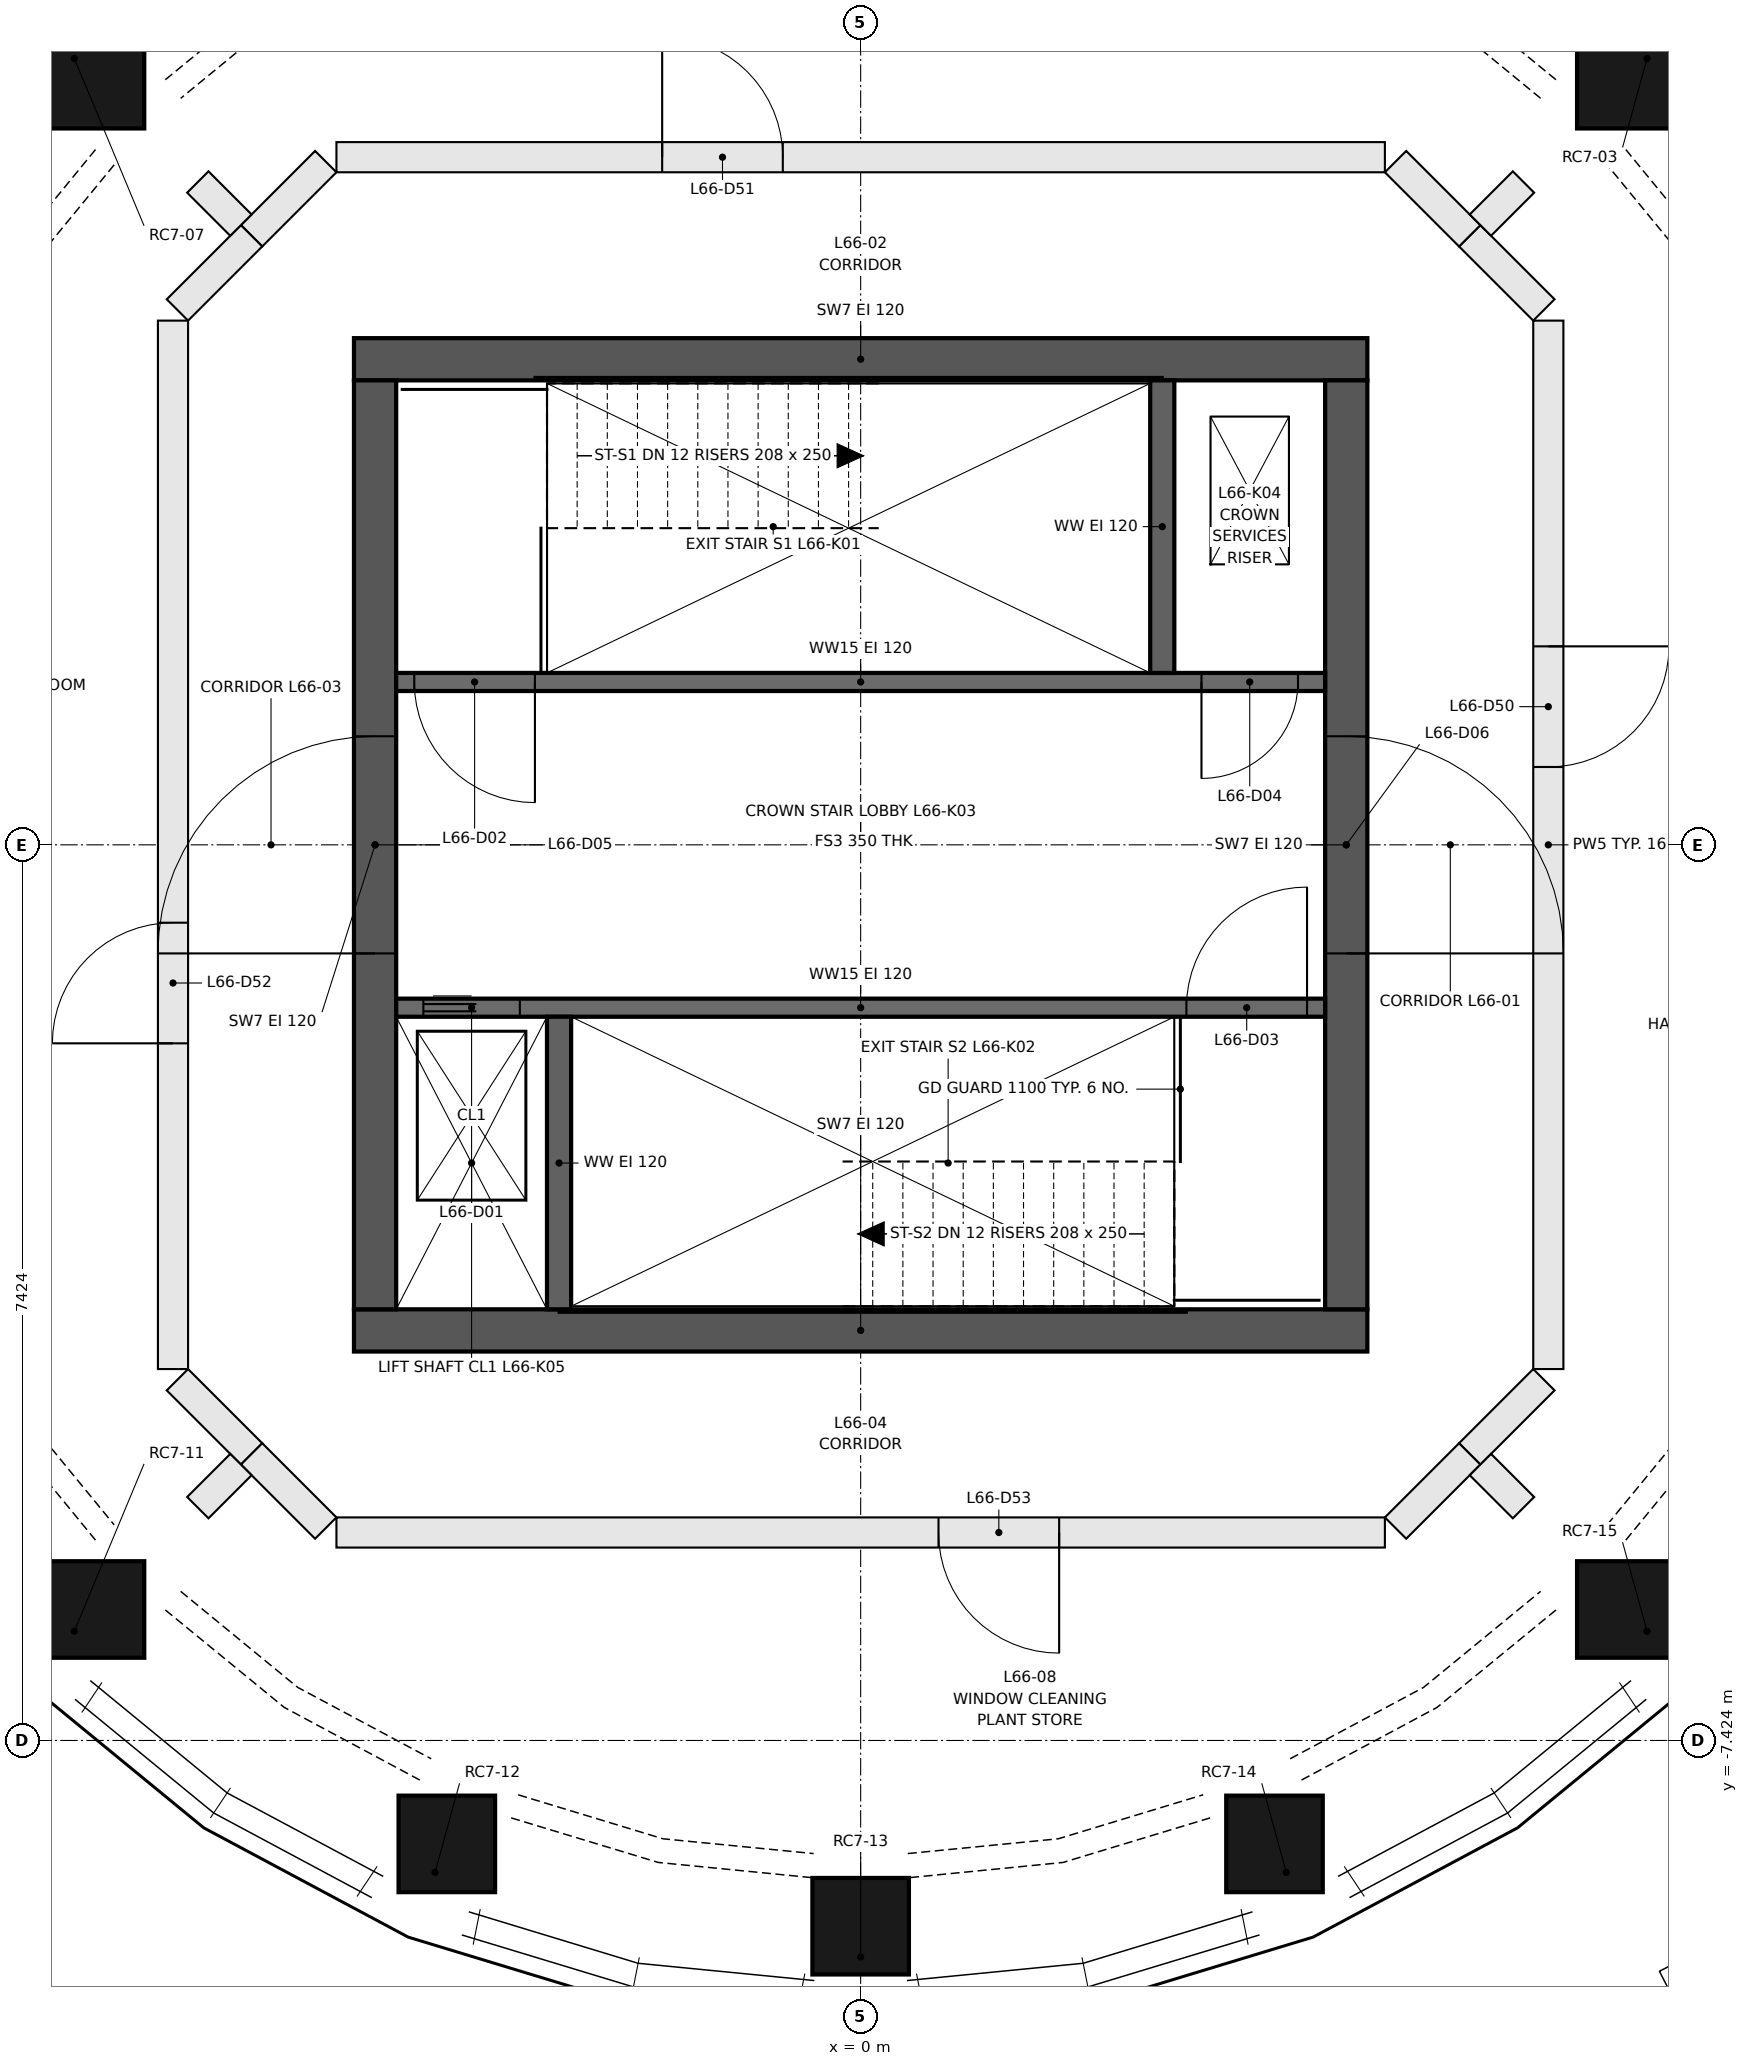
"""IFC4 building model, lengths in metres.
Left out: names, types, materials, properties, quantities, classifications, styles, units other than length and angle.
Written with IfcOpenShell. Run it as: python <this file> out.ifc"""

import sys

from ifc_helpers import new_model, si_unit, direction, frame, frame_2d, origin, origin_2d, place, context, subcontext, project, spatial, rectangle, extrude, element, fill, save


model = new_model("IFC4")
c1 = context("Model", 3, precision=1e-05, world=origin(), true_north=direction((0.0, 1.0)))
c2 = subcontext(c1, "Body", "Model", "MODEL_VIEW")
j1 = project(units=[si_unit("LENGTHUNIT", "METRE"), si_unit("PLANEANGLEUNIT", "RADIAN")], contexts=[c1])
p1 = place(None, origin())
s1 = spatial("IfcSite", under=j1, at=p1, CompositionType="ELEMENT")
p2 = place(p1, origin())
s2 = spatial("IfcBuilding", under=s1, at=p2, CompositionType="ELEMENT")
p3 = place(p2, frame((0.0, 0.0, 244.4)))
s3 = spatial("IfcBuildingStorey", under=s2, at=p3, CompositionType="ELEMENT", Elevation=244.4)
for number, where, z_axis, x_axis in (
    (1, (6.518, 6.518, 0.5), (0.0, 0.0, 1.0), (0.707, -0.707, 0.0)),
    (2, (-6.518, 6.518, 0.5), (0.0, 0.0, 1.0), (0.707, 0.707, 0.0)),
    (3, (-6.518, -6.518, 0.5), (0.0, 0.0, 1.0), (-0.707, 0.707, 0.0)),
):
    element("IfcColumn", number, at=place(p3, frame(where, z_axis=z_axis, x_axis=x_axis)), inside=s3, PredefinedType="COLUMN", context=c2, shape_type="SweptSolid", body=[
        extrude(rectangle(XDim=0.8, YDim=0.8, at=origin_2d()), origin(), (0.0, -0.342, 0.94), 2.979),
    ])
p4 = place(p3, frame((-3.528, -8.517, 0.5), z_axis=(0.0, 0.0, 1.0), x_axis=(-0.923876553121, 0.38269062517, 0.0)))
e4 = element("IfcColumn", 4, at=p4, inside=s3, PredefinedType="COLUMN", context=c2, shape_type="SweptSolid", body=[
    extrude(rectangle(XDim=0.8, YDim=0.8, at=origin_2d()), origin(), (0.0, -0.342, 0.94), 2.979),
])
p5 = place(p3, frame((0.0, -9.218, 0.5), z_axis=(0.0, 0.0, 1.0), x_axis=(-1.0, 0.0, 0.0)))
e5 = element("IfcColumn", 5, at=p5, inside=s3, PredefinedType="COLUMN", context=c2, shape_type="SweptSolid", body=[
    extrude(rectangle(XDim=0.8, YDim=0.8, at=origin_2d()), origin(), (0.0, -0.342, 0.94), 2.979),
])
p6 = place(p3, frame((3.528, -8.517, 0.5), z_axis=(0.0, 0.0, 1.0), x_axis=(-0.923876553121, -0.38269062517, 0.0)))
e6 = element("IfcColumn", 6, at=p6, inside=s3, PredefinedType="COLUMN", context=c2, shape_type="SweptSolid", body=[
    extrude(rectangle(XDim=0.8, YDim=0.8, at=origin_2d()), origin(), (0.0, -0.342, 0.94), 2.979),
])
p7 = place(p3, frame((6.518, -6.518, 0.5), z_axis=(0.0, 0.0, 1.0), x_axis=(-0.707106781187, -0.707106781187, 0.0)))
e7 = element("IfcColumn", 7, at=p7, inside=s3, PredefinedType="COLUMN", context=c2, shape_type="SweptSolid", body=[
    extrude(rectangle(XDim=0.8, YDim=0.8, at=origin_2d()), origin(), (0.0, -0.342, 0.94), 2.979),
])
for number, where, z_axis, x_axis in (
    (8, (-4.2, -4.025, 0.0), (0.0, 0.0, 1.0), (1.0, 0.0, 0.0)),
    (9, (-4.2, 4.025, 0.0), (0.0, 0.0, 1.0), (1.0, 0.0, 0.0)),
):
    element("IfcWall", number, at=place(p3, frame(where, z_axis=z_axis, x_axis=x_axis)), inside=s3, PredefinedType="SHEAR", context=c2, shape_type="SweptSolid", body=[
        extrude(rectangle(XDim=8.4, YDim=0.35, at=frame_2d((4.2, 0.0))), origin(), (0.0, 0.0, 1.0), 2.95),
    ])
p8 = place(p3, frame((-4.025, -3.85, 0.0), z_axis=(0.0, 0.0, 1.0), x_axis=(0.0, 1.0, 0.0)))
e10 = element("IfcWall", 10, at=p8, inside=s3, PredefinedType="SHEAR", context=c2, shape_type="SweptSolid", body=[
    extrude(rectangle(XDim=7.7, YDim=0.35, at=frame_2d((3.85, 0.0))), origin(), (0.0, 0.0, 1.0), 2.95),
])
p9 = place(p8, frame((2.95, 0.0, 0.0)))
e11 = element("IfcOpeningElement", 11, at=p9, cuts=e10, PredefinedType="OPENING", context=c2, shape_type="SweptSolid", body=[
    extrude(rectangle(XDim=1.8, YDim=2.1, at=frame_2d((0.9, 1.05))), frame((0.0, 0.185, 0.0), z_axis=(0.0, -1.0, 0.0), x_axis=(1.0, 0.0, 0.0)), (0.0, 0.0, 1.0), 0.37),
])
p10 = place(p3, frame((4.025, -3.85, 0.0), z_axis=(0.0, 0.0, 1.0), x_axis=(0.0, 1.0, 0.0)))
e12 = element("IfcWall", 12, at=p10, inside=s3, PredefinedType="SHEAR", context=c2, shape_type="SweptSolid", body=[
    extrude(rectangle(XDim=7.7, YDim=0.35, at=frame_2d((3.85, 0.0))), origin(), (0.0, 0.0, 1.0), 2.95),
])
p11 = place(p10, frame((2.95, 0.0, 0.0)))
e13 = element("IfcOpeningElement", 13, at=p11, cuts=e12, PredefinedType="OPENING", context=c2, shape_type="SweptSolid", body=[
    extrude(rectangle(XDim=1.8, YDim=2.1, at=frame_2d((0.9, 1.05))), frame((0.0, 0.185, 0.0), z_axis=(0.0, -1.0, 0.0), x_axis=(1.0, 0.0, 0.0)), (0.0, 0.0, 1.0), 0.37),
])
p12 = place(p3, frame((-3.85, 1.35, 0.0), z_axis=(0.0, 0.0, 1.0), x_axis=(1.0, 0.0, 0.0)))
e14 = element("IfcWall", 14, at=p12, inside=s3, PredefinedType="SHEAR", context=c2, shape_type="SweptSolid", body=[
    extrude(rectangle(XDim=7.7, YDim=0.15, at=frame_2d((3.85, 0.0))), origin(), (0.0, 0.0, 1.0), 2.95),
])
p13 = place(p12, frame((0.15, 0.0, 0.0)))
e15 = element("IfcOpeningElement", 15, at=p13, cuts=e14, PredefinedType="OPENING", context=c2, shape_type="SweptSolid", body=[
    extrude(rectangle(XDim=1.0, YDim=2.1, at=frame_2d((0.5, 1.05))), frame((0.0, 0.085, 0.0), z_axis=(0.0, -1.0, 0.0), x_axis=(1.0, 0.0, 0.0)), (0.0, 0.0, 1.0), 0.17),
])
p14 = place(p12, frame((6.675, 0.0, 0.0)))
e16 = element("IfcOpeningElement", 16, at=p14, cuts=e14, PredefinedType="OPENING", context=c2, shape_type="SweptSolid", body=[
    extrude(rectangle(XDim=0.8, YDim=2.1, at=frame_2d((0.4, 1.05))), frame((0.0, 0.085, 0.0), z_axis=(0.0, -1.0, 0.0), x_axis=(1.0, 0.0, 0.0)), (0.0, 0.0, 1.0), 0.17),
])
p15 = place(p3, frame((-3.85, -1.35, 0.0), z_axis=(0.0, 0.0, 1.0), x_axis=(1.0, 0.0, 0.0)))
e17 = element("IfcWall", 17, at=p15, inside=s3, PredefinedType="SHEAR", context=c2, shape_type="SweptSolid", body=[
    extrude(rectangle(XDim=7.7, YDim=0.15, at=frame_2d((3.85, 0.0))), origin(), (0.0, 0.0, 1.0), 2.95),
])
p16 = place(p15, frame((0.225, 0.0, 0.0)))
e18 = element("IfcOpeningElement", 18, at=p16, cuts=e17, PredefinedType="OPENING", context=c2, shape_type="SweptSolid", body=[
    extrude(rectangle(XDim=0.8, YDim=2.1, at=frame_2d((0.4, 1.05))), frame((0.0, 0.085, 0.0), z_axis=(0.0, -1.0, 0.0), x_axis=(1.0, 0.0, 0.0)), (0.0, 0.0, 1.0), 0.17),
])
p17 = place(p15, frame((6.55, 0.0, 0.0)))
e19 = element("IfcOpeningElement", 19, at=p17, cuts=e17, PredefinedType="OPENING", context=c2, shape_type="SweptSolid", body=[
    extrude(rectangle(XDim=1.0, YDim=2.1, at=frame_2d((0.5, 1.05))), frame((0.0, 0.085, 0.0), z_axis=(0.0, -1.0, 0.0), x_axis=(1.0, 0.0, 0.0)), (0.0, 0.0, 1.0), 0.17),
])
for number, where, z_axis, x_axis in (
    (20, (2.5, 1.425, 0.0), (0.0, 0.0, 1.0), (0.0, 1.0, 0.0)),
    (21, (-2.5, -1.425, 0.0), (0.0, 0.0, 1.0), (0.0, -1.0, 0.0)),
):
    element("IfcWall", number, at=place(p3, frame(where, z_axis=z_axis, x_axis=x_axis)), inside=s3, PredefinedType="SHEAR", context=c2, shape_type="SweptSolid", body=[
        extrude(rectangle(XDim=2.425, YDim=0.2, at=frame_2d((1.212, 0.0))), origin(), (0.0, 0.0, 1.0), 2.95),
    ])
for number, where, z_axis, x_axis in (
    (22, (5.049, 5.049, 0.0), (0.0, 0.0, 1.0), (0.707, -0.707, 0.0)),
    (23, (5.663, -4.434, 0.0), (0.0, 0.0, 1.0), (-0.707, -0.707, 0.0)),
):
    element("IfcWall", number, at=place(p3, frame(where, z_axis=z_axis, x_axis=x_axis)), inside=s3, PredefinedType="PARTITIONING", context=c2, shape_type="SweptSolid", body=[
        extrude(rectangle(XDim=0.87, YDim=0.25, at=frame_2d((0.435, 0.0))), origin(), (0.0, 0.0, 1.0), 2.95),
    ])
p18 = place(p3, frame((5.7, 4.345, 0.0), z_axis=(0.0, 0.0, 1.0), x_axis=(0.0, -1.0, 0.0)))
e24 = element("IfcWall", 24, at=p18, inside=s3, PredefinedType="PARTITIONING", context=c2, shape_type="SweptSolid", body=[
    extrude(rectangle(XDim=8.69, YDim=0.25, at=frame_2d((4.345, 0.0))), origin(), (0.0, 0.0, 1.0), 2.95),
])
p19 = place(p18, frame((2.7, 0.0, 0.0)))
e25 = element("IfcOpeningElement", 25, at=p19, cuts=e24, PredefinedType="OPENING", context=c2, shape_type="SweptSolid", body=[
    extrude(rectangle(XDim=1.0, YDim=2.1, at=frame_2d((0.5, 1.05))), frame((0.0, 0.135, 0.0), z_axis=(0.0, -1.0, 0.0), x_axis=(1.0, 0.0, 0.0)), (0.0, 0.0, 1.0), 0.27),
])
p20 = place(p3, frame((-5.049, 5.049, 0.0), z_axis=(0.0, 0.0, 1.0), x_axis=(0.707247149774, 0.706966384729, 0.0)))
e26 = element("IfcWall", 26, at=p20, inside=s3, PredefinedType="PARTITIONING", context=c2, shape_type="SweptSolid", body=[
    extrude(rectangle(XDim=0.87, YDim=0.25, at=frame_2d((0.435, 0.0))), origin(), (0.0, 0.0, 1.0), 2.95),
])
p21 = place(p3, frame((-4.345, 5.7, 0.0), z_axis=(0.0, 0.0, 1.0), x_axis=(1.0, 0.0, 0.0)))
e27 = element("IfcWall", 27, at=p21, inside=s3, PredefinedType="PARTITIONING", context=c2, shape_type="SweptSolid", body=[
    extrude(rectangle(XDim=8.69, YDim=0.25, at=frame_2d((4.345, 0.0))), origin(), (0.0, 0.0, 1.0), 2.95),
])
p22 = place(p21, frame((2.7, 0.0, 0.0)))
e28 = element("IfcOpeningElement", 28, at=p22, cuts=e27, PredefinedType="OPENING", context=c2, shape_type="SweptSolid", body=[
    extrude(rectangle(XDim=1.0, YDim=2.1, at=frame_2d((0.5, 1.05))), frame((0.0, 0.135, 0.0), z_axis=(0.0, -1.0, 0.0), x_axis=(1.0, 0.0, 0.0)), (0.0, 0.0, 1.0), 0.27),
])
p23 = place(p3, frame((4.434, 5.663, 0.0), z_axis=(0.0, 0.0, 1.0), x_axis=(0.707247149774, -0.706966384729, 0.0)))
e29 = element("IfcWall", 29, at=p23, inside=s3, PredefinedType="PARTITIONING", context=c2, shape_type="SweptSolid", body=[
    extrude(rectangle(XDim=0.87, YDim=0.25, at=frame_2d((0.435, 0.0))), origin(), (0.0, 0.0, 1.0), 2.95),
])
p24 = place(p3, frame((-5.7, -4.345, 0.0), z_axis=(0.0, 0.0, 1.0), x_axis=(0.0, 1.0, 0.0)))
e30 = element("IfcWall", 30, at=p24, inside=s3, PredefinedType="PARTITIONING", context=c2, shape_type="SweptSolid", body=[
    extrude(rectangle(XDim=8.69, YDim=0.25, at=frame_2d((4.345, 0.0))), origin(), (0.0, 0.0, 1.0), 2.95),
])
p25 = place(p24, frame((2.7, 0.0, 0.0)))
e31 = element("IfcOpeningElement", 31, at=p25, cuts=e30, PredefinedType="OPENING", context=c2, shape_type="SweptSolid", body=[
    extrude(rectangle(XDim=1.0, YDim=2.1, at=frame_2d((0.5, 1.05))), frame((0.0, 0.135, 0.0), z_axis=(0.0, -1.0, 0.0), x_axis=(1.0, 0.0, 0.0)), (0.0, 0.0, 1.0), 0.27),
])
for number, where, z_axis, x_axis in (
    (32, (-5.663, 4.434, 0.0), (0.0, 0.0, 1.0), (0.707, 0.707, 0.0)),
    (33, (-5.049, -5.049, 0.0), (0.0, 0.0, 1.0), (-0.707, 0.707, 0.0)),
    (34, (-4.434, -5.663, 0.0), (0.0, 0.0, 1.0), (-0.707, 0.707, 0.0)),
):
    element("IfcWall", number, at=place(p3, frame(where, z_axis=z_axis, x_axis=x_axis)), inside=s3, PredefinedType="PARTITIONING", context=c2, shape_type="SweptSolid", body=[
        extrude(rectangle(XDim=0.87, YDim=0.25, at=frame_2d((0.435, 0.0))), origin(), (0.0, 0.0, 1.0), 2.95),
    ])
p26 = place(p3, frame((4.345, -5.7, 0.0), z_axis=(0.0, 0.0, 1.0), x_axis=(-1.0, 0.0, 0.0)))
e35 = element("IfcWall", 35, at=p26, inside=s3, PredefinedType="PARTITIONING", context=c2, shape_type="SweptSolid", body=[
    extrude(rectangle(XDim=8.69, YDim=0.25, at=frame_2d((4.345, 0.0))), origin(), (0.0, 0.0, 1.0), 2.95),
])
p27 = place(p26, frame((2.7, 0.0, 0.0)))
e36 = element("IfcOpeningElement", 36, at=p27, cuts=e35, PredefinedType="OPENING", context=c2, shape_type="SweptSolid", body=[
    extrude(rectangle(XDim=1.0, YDim=2.1, at=frame_2d((0.5, 1.05))), frame((0.0, 0.135, 0.0), z_axis=(0.0, -1.0, 0.0), x_axis=(1.0, 0.0, 0.0)), (0.0, 0.0, 1.0), 0.27),
])
p28 = place(p3, frame((5.049, -5.049, 0.0), z_axis=(0.0, 0.0, 1.0), x_axis=(-0.707247149774, -0.706966384729, 0.0)))
e37 = element("IfcWall", 37, at=p28, inside=s3, PredefinedType="PARTITIONING", context=c2, shape_type="SweptSolid", body=[
    extrude(rectangle(XDim=0.87, YDim=0.25, at=frame_2d((0.435, 0.0))), origin(), (0.0, 0.0, 1.0), 2.95),
])
for number, where, z_axis, x_axis in (
    (38, (5.137, 5.137, 0.0), (0.0, 0.0, 1.0), (0.707, 0.707, 0.0)),
    (39, (5.494, -5.494, 0.0), (0.0, 0.0, 1.0), (-0.707, 0.707, 0.0)),
    (40, (-5.137, 5.137, 0.0), (0.0, 0.0, 1.0), (-0.707, 0.707, 0.0)),
    (41, (-5.137, -5.137, 0.0), (0.0, 0.0, 1.0), (-0.707, -0.707, 0.0)),
):
    element("IfcWall", number, at=place(p3, frame(where, z_axis=z_axis, x_axis=x_axis)), inside=s3, PredefinedType="PARTITIONING", context=c2, shape_type="SweptSolid", body=[
        extrude(rectangle(XDim=0.505, YDim=0.25, at=frame_2d((0.252, 0.0))), origin(), (0.0, 0.0, 1.0), 2.95),
    ])
p29 = place(p16, origin())
e42 = element("IfcDoor", 42, at=p29, inside=s3, OperationType="DOUBLE_DOOR_SLIDING", PredefinedType="DOOR", context=c2, shape_type="SweptSolid", body=[
    extrude(rectangle(XDim=0.8, YDim=2.1, at=frame_2d((0.4, 1.05))), frame((0.0, 0.025, 0.0), z_axis=(0.0, -1.0, 0.0), x_axis=(1.0, 0.0, 0.0)), (0.0, 0.0, 1.0), 0.05),
])
fill(e18, e42)
p30 = place(p13, frame((1.0, 0.0, 0.0), z_axis=(0.0, 0.0, 1.0), x_axis=(-1.0, 0.0, 0.0)))
e43 = element("IfcDoor", 43, at=p30, inside=s3, OperationType="SINGLE_SWING_RIGHT", PredefinedType="DOOR", context=c2, shape_type="SweptSolid", body=[
    extrude(rectangle(XDim=1.0, YDim=2.1, at=frame_2d((0.5, 1.05))), frame((0.0, 0.025, 0.0), z_axis=(0.0, -1.0, 0.0), x_axis=(1.0, 0.0, 0.0)), (0.0, 0.0, 1.0), 0.05),
])
fill(e15, e43)
p31 = place(p17, origin())
e44 = element("IfcDoor", 44, at=p31, inside=s3, OperationType="SINGLE_SWING_RIGHT", PredefinedType="DOOR", context=c2, shape_type="SweptSolid", body=[
    extrude(rectangle(XDim=1.0, YDim=2.1, at=frame_2d((0.5, 1.05))), frame((0.0, 0.025, 0.0), z_axis=(0.0, -1.0, 0.0), x_axis=(1.0, 0.0, 0.0)), (0.0, 0.0, 1.0), 0.05),
])
fill(e19, e44)
p32 = place(p14, frame((0.8, 0.0, 0.0), z_axis=(0.0, 0.0, 1.0), x_axis=(-1.0, 0.0, 0.0)))
e45 = element("IfcDoor", 45, at=p32, inside=s3, OperationType="SINGLE_SWING_LEFT", PredefinedType="DOOR", context=c2, shape_type="SweptSolid", body=[
    extrude(rectangle(XDim=0.8, YDim=2.1, at=frame_2d((0.4, 1.05))), frame((0.0, 0.025, 0.0), z_axis=(0.0, -1.0, 0.0), x_axis=(1.0, 0.0, 0.0)), (0.0, 0.0, 1.0), 0.05),
])
fill(e16, e45)
p33 = place(p9, origin())
e46 = element("IfcDoor", 46, at=p33, inside=s3, OperationType="DOUBLE_DOOR_SINGLE_SWING", PredefinedType="DOOR", context=c2, shape_type="SweptSolid", body=[
    extrude(rectangle(XDim=1.8, YDim=2.1, at=frame_2d((0.9, 1.05))), frame((0.0, 0.025, 0.0), z_axis=(0.0, -1.0, 0.0), x_axis=(1.0, 0.0, 0.0)), (0.0, 0.0, 1.0), 0.05),
])
fill(e11, e46)
p34 = place(p11, frame((1.8, 0.0, 0.0), z_axis=(0.0, 0.0, 1.0), x_axis=(-1.0, 0.0, 0.0)))
e47 = element("IfcDoor", 47, at=p34, inside=s3, OperationType="DOUBLE_DOOR_SINGLE_SWING", PredefinedType="DOOR", context=c2, shape_type="SweptSolid", body=[
    extrude(rectangle(XDim=1.8, YDim=2.1, at=frame_2d((0.9, 1.05))), frame((0.0, 0.025, 0.0), z_axis=(0.0, -1.0, 0.0), x_axis=(1.0, 0.0, 0.0)), (0.0, 0.0, 1.0), 0.05),
])
fill(e13, e47)
p35 = place(p19, origin())
e48 = element("IfcDoor", 48, at=p35, inside=s3, OperationType="SINGLE_SWING_LEFT", PredefinedType="DOOR", context=c2, shape_type="SweptSolid", body=[
    extrude(rectangle(XDim=1.0, YDim=2.1, at=frame_2d((0.5, 1.05))), frame((0.0, 0.025, 0.0), z_axis=(0.0, -1.0, 0.0), x_axis=(1.0, 0.0, 0.0)), (0.0, 0.0, 1.0), 0.05),
])
fill(e25, e48)
p36 = place(p22, origin())
e49 = element("IfcDoor", 49, at=p36, inside=s3, OperationType="SINGLE_SWING_LEFT", PredefinedType="DOOR", context=c2, shape_type="SweptSolid", body=[
    extrude(rectangle(XDim=1.0, YDim=2.1, at=frame_2d((0.5, 1.05))), frame((0.0, 0.025, 0.0), z_axis=(0.0, -1.0, 0.0), x_axis=(1.0, 0.0, 0.0)), (0.0, 0.0, 1.0), 0.05),
])
fill(e28, e49)
p37 = place(p25, origin())
e50 = element("IfcDoor", 50, at=p37, inside=s3, OperationType="SINGLE_SWING_LEFT", PredefinedType="DOOR", context=c2, shape_type="SweptSolid", body=[
    extrude(rectangle(XDim=1.0, YDim=2.1, at=frame_2d((0.5, 1.05))), frame((0.0, 0.025, 0.0), z_axis=(0.0, -1.0, 0.0), x_axis=(1.0, 0.0, 0.0)), (0.0, 0.0, 1.0), 0.05),
])
fill(e31, e50)
p38 = place(p27, origin())
e51 = element("IfcDoor", 51, at=p38, inside=s3, OperationType="SINGLE_SWING_LEFT", PredefinedType="DOOR", context=c2, shape_type="SweptSolid", body=[
    extrude(rectangle(XDim=1.0, YDim=2.1, at=frame_2d((0.5, 1.05))), frame((0.0, 0.025, 0.0), z_axis=(0.0, -1.0, 0.0), x_axis=(1.0, 0.0, 0.0)), (0.0, 0.0, 1.0), 0.05),
])
fill(e36, e51)
save(model, sys.argv[1])
